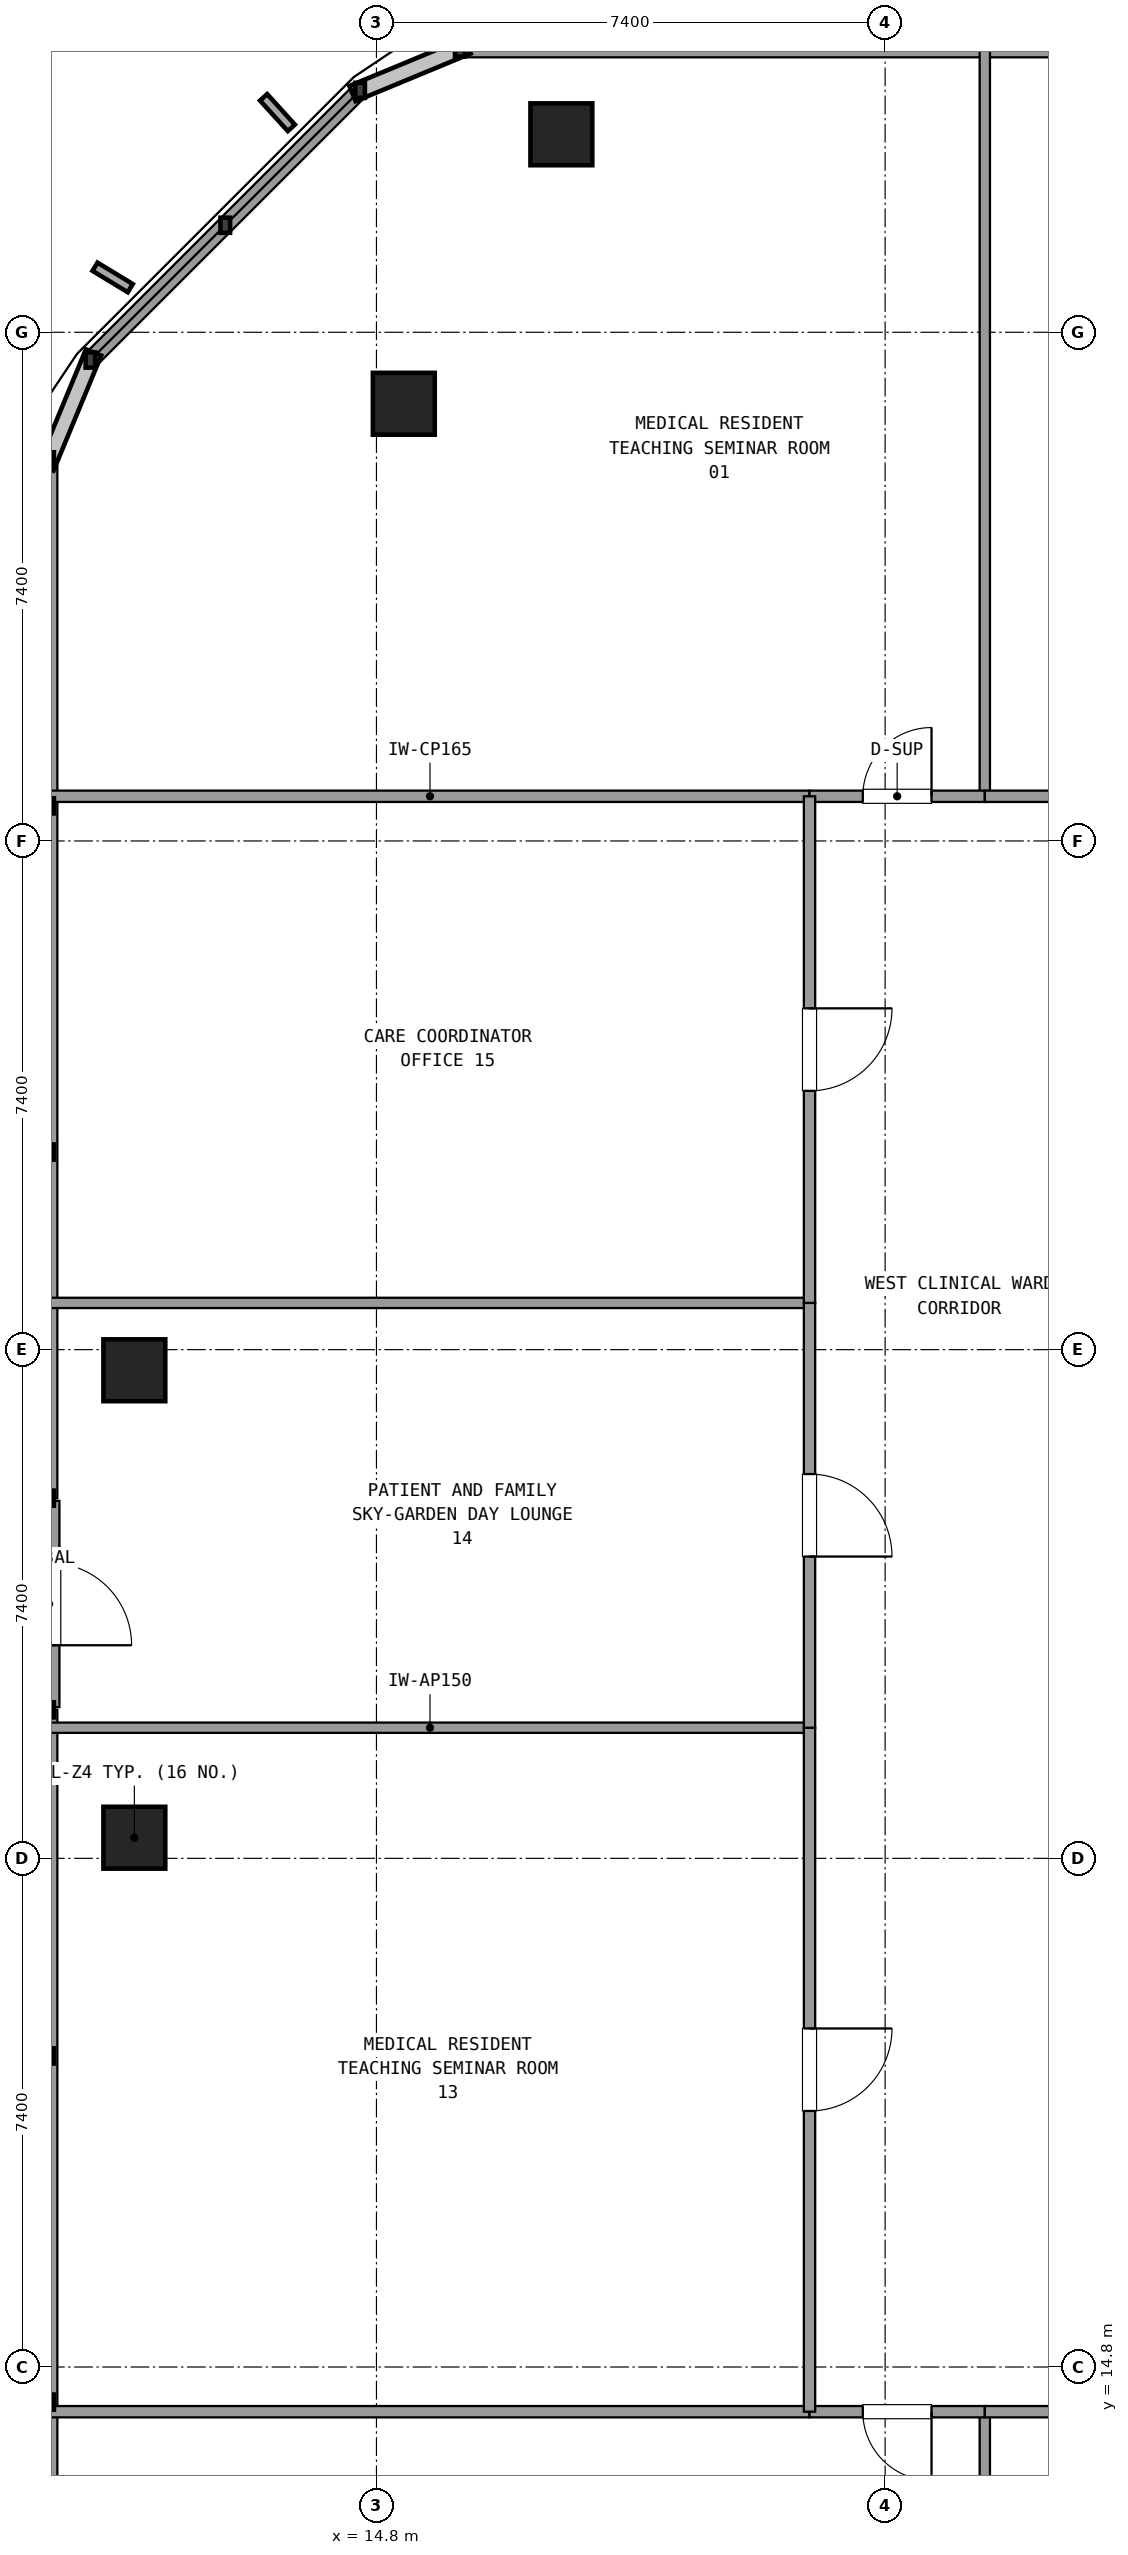
"""IFC4 building model, lengths in metres.
Left out: names, types, materials, properties, quantities, classifications, styles, units other than length and angle.
Written with IfcOpenShell. Run it as: python <this file> out.ifc"""

import sys

from ifc_helpers import new_model, si_unit, direction, frame, frame_2d, origin, origin_2d, place, context, subcontext, project, spatial, rectangle, extrude, element, fill, save


model = new_model("IFC4")
c1 = context("Model", 3, precision=1e-05, world=origin(), true_north=direction((0.0, 1.0)))
c2 = subcontext(c1, "Body", "Model", "MODEL_VIEW")
j1 = project(units=[si_unit("LENGTHUNIT", "METRE"), si_unit("PLANEANGLEUNIT", "RADIAN")], contexts=[c1])
p1 = place(None, origin())
s1 = spatial("IfcSite", under=j1, at=p1, CompositionType="ELEMENT")
p2 = place(p1, origin())
s2 = spatial("IfcBuilding", under=s1, at=p2, CompositionType="ELEMENT")
p3 = place(p2, frame((0.0, 0.0, 221.58)))
s3 = spatial("IfcBuildingStorey", under=s2, at=p3, CompositionType="ELEMENT", Elevation=221.58)
for number, where, z_axis, x_axis in (
    (1, (11.278, 22.5, 0.021), (0.0, 0.0, 1.0), (1.0, 0.0, 0.0)),
    (2, (17.49, 47.28, 0.021), (0.0, 0.0, 1.0), (1.0, 0.0, 0.0)),
    (3, (15.198, 43.36, 0.021), (0.0, 0.0, 1.0), (1.0, 0.0, 0.0)),
    (4, (11.278, 29.3, 0.021), (0.0, 0.0, 1.0), (1.0, 0.0, 0.0)),
):
    element("IfcColumn", number, at=place(p3, frame(where, z_axis=z_axis, x_axis=x_axis)), inside=s3, PredefinedType="COLUMN", context=c2, shape_type="SweptSolid", body=[
        extrude(rectangle(XDim=0.9, YDim=0.9, at=origin_2d()), origin(), (0.0, 0.0, 1.0), 3.579),
    ])
p4 = place(p3, frame((57.987, 48.52, 0.0), z_axis=(0.0, 0.0, 1.0), x_axis=(-1.0, 0.0, 0.0)))
e5 = element("IfcWall", 5, at=p4, inside=s3, PredefinedType="SOLIDWALL", context=c2, shape_type="SweptSolid", body=[
    extrude(rectangle(XDim=41.974, YDim=0.24, at=frame_2d((20.987, 0.0))), origin(), (0.0, 0.0, 1.0), 0.85),
])
p5 = place(p3, frame((14.562, 47.919, 0.0), z_axis=(0.0, 0.0, 1.0), x_axis=(-0.707128783731, -0.707084777957, 0.0)))
e6 = element("IfcWall", 6, at=p5, inside=s3, PredefinedType="SOLIDWALL", context=c2, shape_type="SweptSolid", body=[
    extrude(rectangle(XDim=5.548, YDim=0.24, at=frame_2d((2.774, 0.0))), origin(), (0.0, 0.0, 1.0), 0.85),
])
p6 = place(p3, frame((10.038, 27.4, 0.0), z_axis=(0.0, 0.0, 1.0), x_axis=(0.0, -1.0, 0.0)))
e7 = element("IfcWall", 7, at=p6, inside=s3, PredefinedType="SOLIDWALL", context=c2, shape_type="SweptSolid", body=[
    extrude(rectangle(XDim=3.0, YDim=0.3, at=frame_2d((1.5, 0.0))), origin(), (0.0, 0.0, 1.0), 2.69),
])
p7 = place(p6, frame((0.9, 0.0, 0.0)))
e8 = element("IfcOpeningElement", 8, at=p7, cuts=e7, PredefinedType="OPENING", context=c2, shape_type="SweptSolid", body=[
    extrude(rectangle(XDim=1.2, YDim=2.2, at=frame_2d((0.6, 1.1))), frame((0.0, 0.16, 0.0), z_axis=(0.0, -1.0, 0.0), x_axis=(1.0, 0.0, 0.0)), (0.0, 0.0, 1.0), 0.32),
])
p8 = place(p3, frame((10.038, 42.545, 0.0), z_axis=(0.0, 0.0, 1.0), x_axis=(0.0, -1.0, 0.0)))
e9 = element("IfcWall", 9, at=p8, inside=s3, PredefinedType="SOLIDWALL", context=c2, shape_type="SweptSolid", body=[
    extrude(rectangle(XDim=15.105, YDim=0.24, at=frame_2d((7.552, 0.0))), origin(), (0.0, 0.0, 1.0), 0.85),
])
p9 = place(p3, frame((10.038, 24.36, 0.0), z_axis=(0.0, 0.0, 1.0), x_axis=(0.0, -1.0, 0.0)))
e10 = element("IfcWall", 10, at=p9, inside=s3, PredefinedType="SOLIDWALL", context=c2, shape_type="SweptSolid", body=[
    extrude(rectangle(XDim=15.105, YDim=0.24, at=frame_2d((7.553, 0.0))), origin(), (0.0, 0.0, 1.0), 0.85),
])
for number, where, z_axis, x_axis in (
    (11, (10.058, 37.65, 0.0), (0.0, 0.0, 1.0), (1.0, 0.0, 0.0)),
    (12, (10.058, 14.15, 0.0), (0.0, 0.0, 1.0), (1.0, 0.0, 0.0)),
):
    element("IfcWall", number, at=place(p3, frame(where, z_axis=z_axis, x_axis=x_axis)), inside=s3, PredefinedType="PARTITIONING", context=c2, shape_type="SweptSolid", body=[
        extrude(rectangle(XDim=11.042, YDim=0.165, at=frame_2d((5.521, 0.0))), origin(), (0.0, 0.0, 1.0), 2.61),
    ])
p10 = place(p3, frame((23.65, 37.65, 0.0), z_axis=(0.0, 0.0, 1.0), x_axis=(0.0, 1.0, 0.0)))
e13 = element("IfcWall", 13, at=p10, inside=s3, PredefinedType="PARTITIONING", context=c2, shape_type="SweptSolid", body=[
    extrude(rectangle(XDim=10.85, YDim=0.15, at=frame_2d((5.425, 0.0))), origin(), (0.0, 0.0, 1.0), 2.61),
])
p11 = place(p3, frame((21.1, 37.65, 0.0), z_axis=(0.0, 0.0, 1.0), x_axis=(1.0, 0.0, 0.0)))
e14 = element("IfcWall", 14, at=p11, inside=s3, PredefinedType="PARTITIONING", context=c2, shape_type="SweptSolid", body=[
    extrude(rectangle(XDim=2.55, YDim=0.165, at=frame_2d((1.275, 0.0))), origin(), (0.0, 0.0, 1.0), 2.61),
])
p12 = place(p11, frame((0.775, 0.0, 0.0)))
e15 = element("IfcOpeningElement", 15, at=p12, cuts=e14, PredefinedType="OPENING", context=c2, shape_type="SweptSolid", body=[
    extrude(rectangle(XDim=1.0, YDim=2.15, at=frame_2d((0.5, 1.075))), frame((0.0, 0.093, 0.0), z_axis=(0.0, -1.0, 0.0), x_axis=(1.0, 0.0, 0.0)), (0.0, 0.0, 1.0), 0.185),
])
p13 = place(p3, frame((23.65, 37.65, 0.0), z_axis=(0.0, 0.0, 1.0), x_axis=(1.0, 0.0, 0.0)))
e16 = element("IfcWall", 16, at=p13, inside=s3, PredefinedType="PARTITIONING", context=c2, shape_type="SweptSolid", body=[
    extrude(rectangle(XDim=5.573, YDim=0.165, at=frame_2d((2.787, 0.0))), origin(), (0.0, 0.0, 1.0), 2.61),
])
p14 = place(p13, frame((2.187, 0.0, 0.0)))
e17 = element("IfcOpeningElement", 17, at=p14, cuts=e16, PredefinedType="OPENING", context=c2, shape_type="SweptSolid", body=[
    extrude(rectangle(XDim=1.2, YDim=2.15, at=frame_2d((0.6, 1.075))), frame((0.0, 0.093, 0.0), z_axis=(0.0, -1.0, 0.0), x_axis=(1.0, 0.0, 0.0)), (0.0, 0.0, 1.0), 0.185),
])
p15 = place(p3, frame((23.65, 14.15, 0.0), z_axis=(0.0, 0.0, 1.0), x_axis=(0.0, -1.0, 0.0)))
e18 = element("IfcWall", 18, at=p15, inside=s3, PredefinedType="PARTITIONING", context=c2, shape_type="SweptSolid", body=[
    extrude(rectangle(XDim=10.85, YDim=0.15, at=frame_2d((5.425, 0.0))), origin(), (0.0, 0.0, 1.0), 2.61),
])
p16 = place(p3, frame((21.1, 14.15, 0.0), z_axis=(0.0, 0.0, 1.0), x_axis=(1.0, 0.0, 0.0)))
e19 = element("IfcWall", 19, at=p16, inside=s3, PredefinedType="PARTITIONING", context=c2, shape_type="SweptSolid", body=[
    extrude(rectangle(XDim=2.55, YDim=0.165, at=frame_2d((1.275, 0.0))), origin(), (0.0, 0.0, 1.0), 2.61),
])
p17 = place(p16, frame((0.775, 0.0, 0.0)))
e20 = element("IfcOpeningElement", 20, at=p17, cuts=e19, PredefinedType="OPENING", context=c2, shape_type="SweptSolid", body=[
    extrude(rectangle(XDim=1.0, YDim=2.15, at=frame_2d((0.5, 1.075))), frame((0.0, 0.093, 0.0), z_axis=(0.0, -1.0, 0.0), x_axis=(1.0, 0.0, 0.0)), (0.0, 0.0, 1.0), 0.185),
])
p18 = place(p3, frame((23.65, 14.15, 0.0), z_axis=(0.0, 0.0, 1.0), x_axis=(1.0, 0.0, 0.0)))
e21 = element("IfcWall", 21, at=p18, inside=s3, PredefinedType="PARTITIONING", context=c2, shape_type="SweptSolid", body=[
    extrude(rectangle(XDim=6.61, YDim=0.165, at=frame_2d((3.305, 0.0))), origin(), (0.0, 0.0, 1.0), 2.61),
])
p19 = place(p18, frame((2.705, 0.0, 0.0)))
e22 = element("IfcOpeningElement", 22, at=p19, cuts=e21, PredefinedType="OPENING", context=c2, shape_type="SweptSolid", body=[
    extrude(rectangle(XDim=1.2, YDim=2.15, at=frame_2d((0.6, 1.075))), frame((0.0, 0.093, 0.0), z_axis=(0.0, -1.0, 0.0), x_axis=(1.0, 0.0, 0.0)), (0.0, 0.0, 1.0), 0.185),
])
p20 = place(p3, frame((21.1, 24.1, 0.0), z_axis=(0.0, 0.0, 1.0), x_axis=(-1.0, 0.0, 0.0)))
e23 = element("IfcWall", 23, at=p20, inside=s3, PredefinedType="PARTITIONING", context=c2, shape_type="SweptSolid", body=[
    extrude(rectangle(XDim=11.042, YDim=0.15, at=frame_2d((5.521, 0.0))), origin(), (0.0, 0.0, 1.0), 2.61),
])
p21 = place(p3, frame((21.1, 14.15, 0.0), z_axis=(0.0, 0.0, 1.0), x_axis=(0.0, 1.0, 0.0)))
e24 = element("IfcWall", 24, at=p21, inside=s3, PredefinedType="PARTITIONING", context=c2, shape_type="SweptSolid", body=[
    extrude(rectangle(XDim=9.95, YDim=0.165, at=frame_2d((4.975, 0.0))), origin(), (0.0, 0.0, 1.0), 2.61),
])
p22 = place(p21, frame((4.375, 0.0, 0.0)))
e25 = element("IfcOpeningElement", 25, at=p22, cuts=e24, PredefinedType="OPENING", context=c2, shape_type="SweptSolid", body=[
    extrude(rectangle(XDim=1.2, YDim=2.15, at=frame_2d((0.6, 1.075))), frame((0.0, 0.093, 0.0), z_axis=(0.0, -1.0, 0.0), x_axis=(1.0, 0.0, 0.0)), (0.0, 0.0, 1.0), 0.185),
])
p23 = place(p3, frame((21.1, 30.28, 0.0), z_axis=(0.0, 0.0, 1.0), x_axis=(-1.0, 0.0, 0.0)))
e26 = element("IfcWall", 26, at=p23, inside=s3, PredefinedType="PARTITIONING", context=c2, shape_type="SweptSolid", body=[
    extrude(rectangle(XDim=11.042, YDim=0.15, at=frame_2d((5.521, 0.0))), origin(), (0.0, 0.0, 1.0), 2.61),
])
p24 = place(p3, frame((21.1, 24.1, 0.0), z_axis=(0.0, 0.0, 1.0), x_axis=(0.0, 1.0, 0.0)))
e27 = element("IfcWall", 27, at=p24, inside=s3, PredefinedType="PARTITIONING", context=c2, shape_type="SweptSolid", body=[
    extrude(rectangle(XDim=6.18, YDim=0.165, at=frame_2d((3.09, 0.0))), origin(), (0.0, 0.0, 1.0), 2.61),
])
p25 = place(p24, frame((2.49, 0.0, 0.0)))
e28 = element("IfcOpeningElement", 28, at=p25, cuts=e27, PredefinedType="OPENING", context=c2, shape_type="SweptSolid", body=[
    extrude(rectangle(XDim=1.2, YDim=2.15, at=frame_2d((0.6, 1.075))), frame((0.0, 0.093, 0.0), z_axis=(0.0, -1.0, 0.0), x_axis=(1.0, 0.0, 0.0)), (0.0, 0.0, 1.0), 0.185),
])
p26 = place(p3, frame((21.1, 30.28, 0.0), z_axis=(0.0, 0.0, 1.0), x_axis=(0.0, 1.0, 0.0)))
e29 = element("IfcWall", 29, at=p26, inside=s3, PredefinedType="PARTITIONING", context=c2, shape_type="SweptSolid", body=[
    extrude(rectangle(XDim=7.37, YDim=0.165, at=frame_2d((3.685, 0.0))), origin(), (0.0, 0.0, 1.0), 2.61),
])
p27 = place(p26, frame((3.085, 0.0, 0.0)))
e30 = element("IfcOpeningElement", 30, at=p27, cuts=e29, PredefinedType="OPENING", context=c2, shape_type="SweptSolid", body=[
    extrude(rectangle(XDim=1.2, YDim=2.15, at=frame_2d((0.6, 1.075))), frame((0.0, 0.093, 0.0), z_axis=(0.0, -1.0, 0.0), x_axis=(1.0, 0.0, 0.0)), (0.0, 0.0, 1.0), 0.185),
])
p28 = place(p12, origin())
e31 = element("IfcDoor", 31, at=p28, inside=s3, OperationType="SINGLE_SWING_RIGHT", PredefinedType="DOOR", context=c2, shape_type="SweptSolid", body=[
    extrude(rectangle(XDim=1.0, YDim=2.15, at=frame_2d((0.5, 1.075))), frame((0.0, 0.025, 0.0), z_axis=(0.0, -1.0, 0.0), x_axis=(1.0, 0.0, 0.0)), (0.0, 0.0, 1.0), 0.05),
])
fill(e15, e31)
p29 = place(p17, frame((1.0, 0.0, 0.0), z_axis=(0.0, 0.0, 1.0), x_axis=(-1.0, 0.0, 0.0)))
e32 = element("IfcDoor", 32, at=p29, inside=s3, OperationType="SINGLE_SWING_RIGHT", PredefinedType="DOOR", context=c2, shape_type="SweptSolid", body=[
    extrude(rectangle(XDim=1.0, YDim=2.15, at=frame_2d((0.5, 1.075))), frame((0.0, 0.025, 0.0), z_axis=(0.0, -1.0, 0.0), x_axis=(1.0, 0.0, 0.0)), (0.0, 0.0, 1.0), 0.05),
])
fill(e20, e32)
p30 = place(p22, frame((1.2, 0.0, 0.0), z_axis=(0.0, 0.0, 1.0), x_axis=(-1.0, 0.0, 0.0)))
e33 = element("IfcDoor", 33, at=p30, inside=s3, OperationType="SINGLE_SWING_RIGHT", PredefinedType="DOOR", context=c2, shape_type="SweptSolid", body=[
    extrude(rectangle(XDim=1.2, YDim=2.15, at=frame_2d((0.6, 1.075))), frame((0.0, 0.025, 0.0), z_axis=(0.0, -1.0, 0.0), x_axis=(1.0, 0.0, 0.0)), (0.0, 0.0, 1.0), 0.05),
])
fill(e25, e33)
p31 = place(p25, frame((1.2, 0.0, 0.0), z_axis=(0.0, 0.0, 1.0), x_axis=(-1.0, 0.0, 0.0)))
e34 = element("IfcDoor", 34, at=p31, inside=s3, OperationType="SINGLE_SWING_LEFT", PredefinedType="DOOR", context=c2, shape_type="SweptSolid", body=[
    extrude(rectangle(XDim=1.2, YDim=2.15, at=frame_2d((0.6, 1.075))), frame((0.0, 0.025, 0.0), z_axis=(0.0, -1.0, 0.0), x_axis=(1.0, 0.0, 0.0)), (0.0, 0.0, 1.0), 0.05),
])
fill(e28, e34)
p32 = place(p27, frame((1.2, 0.0, 0.0), z_axis=(0.0, 0.0, 1.0), x_axis=(-1.0, 0.0, 0.0)))
e35 = element("IfcDoor", 35, at=p32, inside=s3, OperationType="SINGLE_SWING_RIGHT", PredefinedType="DOOR", context=c2, shape_type="SweptSolid", body=[
    extrude(rectangle(XDim=1.2, YDim=2.15, at=frame_2d((0.6, 1.075))), frame((0.0, 0.025, 0.0), z_axis=(0.0, -1.0, 0.0), x_axis=(1.0, 0.0, 0.0)), (0.0, 0.0, 1.0), 0.05),
])
fill(e30, e35)
save(model, sys.argv[1])
